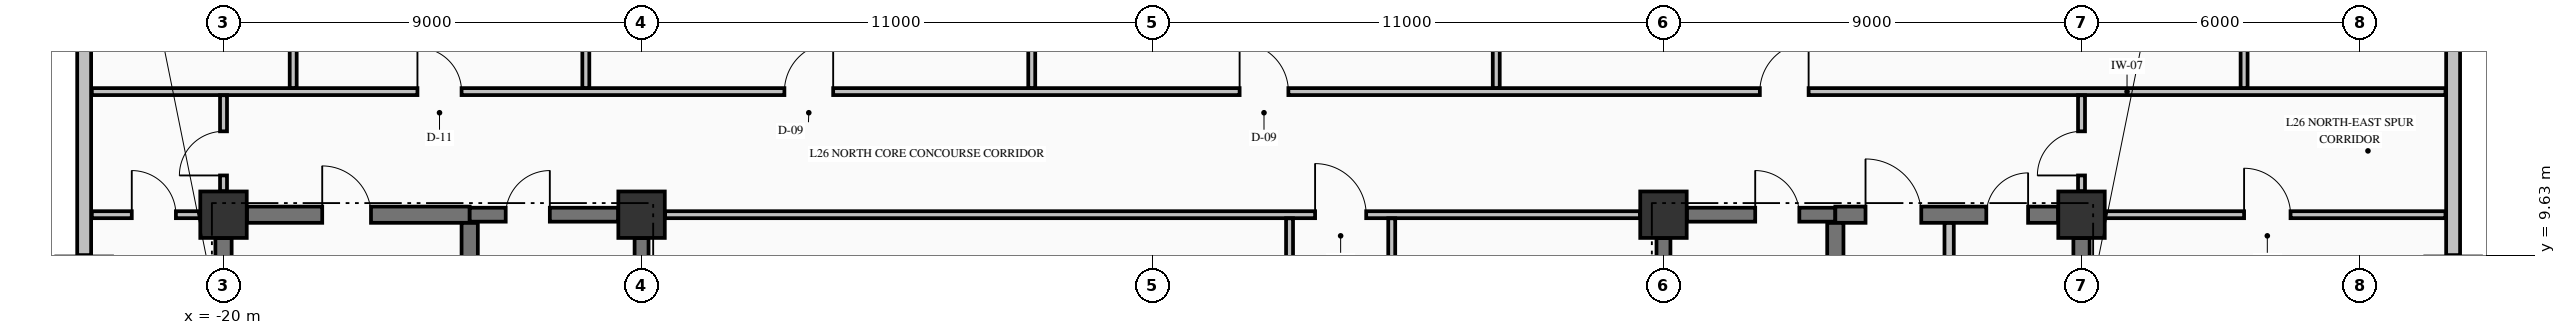
"""IFC4 building model, lengths in metres.
Left out: names, types, materials, properties, quantities, classifications, styles, units other than length and angle.
Written with IfcOpenShell. Run it as: python <this file> out.ifc"""

import sys

from ifc_helpers import new_model, si_unit, direction, frame, frame_2d, origin, origin_2d, place, context, subcontext, project, spatial, rectangle, extrude, element, fill, save


model = new_model("IFC4")
c1 = context("Model", 3, precision=1e-05, world=origin(), true_north=direction((0.0, 1.0)))
c2 = subcontext(c1, "Body", "Model", "MODEL_VIEW")
j1 = project(units=[si_unit("LENGTHUNIT", "METRE"), si_unit("PLANEANGLEUNIT", "RADIAN")], contexts=[c1])
p1 = place(None, origin())
s1 = spatial("IfcSite", under=j1, at=p1, CompositionType="ELEMENT")
p2 = place(p1, origin())
s2 = spatial("IfcBuilding", under=s1, at=p2, CompositionType="ELEMENT")
p3 = place(p2, frame((0.0, 0.0, 105.64)))
s3 = spatial("IfcBuildingStorey", under=s2, at=p3, CompositionType="ELEMENT", Elevation=105.64)
for number, where, z_axis, x_axis in (
    (1, (-20.0, 10.5, -0.25), (0.0, 0.0, 1.0), (1.0, 0.0, 0.0)),
    (2, (-11.0, 10.5, -0.25), (0.0, 0.0, 1.0), (1.0, 0.0, 0.0)),
    (3, (11.0, 10.5, -0.25), (0.0, 0.0, 1.0), (1.0, 0.0, 0.0)),
    (4, (20.0, 10.5, -0.25), (0.0, 0.0, 1.0), (1.0, 0.0, 0.0)),
):
    element("IfcColumn", number, at=place(p3, frame(where, z_axis=z_axis, x_axis=x_axis)), inside=s3, PredefinedType="COLUMN", context=c2, shape_type="SweptSolid", body=[
        extrude(rectangle(XDim=1.0, YDim=1.0, at=origin_2d()), origin(), (0.0, 0.0, 1.0), 3.57),
    ])
for number, where, z_axis, x_axis in (
    (5, (28.0, 9.63, 0.0), (0.0, 0.0, 1.0), (0.0, 1.0, 0.0)),
    (6, (-23.0, 20.37, 0.0), (0.0, 0.0, 1.0), (0.0, -1.0, 0.0)),
):
    element("IfcWall", number, at=place(p3, frame(where, z_axis=z_axis, x_axis=x_axis)), inside=s3, PredefinedType="STANDARD", context=c2, shape_type="SweptSolid", body=[
        extrude(rectangle(XDim=10.74, YDim=0.3, at=frame_2d((5.37, 0.0))), origin(), (0.0, 0.0, 1.0), 2.712),
    ])
p4 = place(p3, frame((-19.496, 10.5, 0.0), z_axis=(0.0, 0.0, 1.0), x_axis=(1.0, 0.0, 0.0)))
e7 = element("IfcWall", 7, at=p4, inside=s3, PredefinedType="SHEAR", context=c2, shape_type="SweptSolid", body=[
    extrude(rectangle(XDim=4.796, YDim=0.35, at=frame_2d((2.398, 0.0))), origin(), (0.0, 0.0, 1.0), 3.32),
])
p5 = place(p4, frame((1.621, 0.0, 0.0)))
e8 = element("IfcOpeningElement", 8, at=p5, cuts=e7, PredefinedType="OPENING", context=c2, shape_type="SweptSolid", body=[
    extrude(rectangle(XDim=1.05, YDim=2.15, at=frame_2d((0.525, 1.075))), frame((0.0, 0.185, 0.0), z_axis=(0.0, -1.0, 0.0), x_axis=(1.0, 0.0, 0.0)), (0.0, 0.0, 1.0), 0.37),
])
p6 = place(p3, frame((-14.7, 10.5, 0.0), z_axis=(0.0, 0.0, 1.0), x_axis=(1.0, 0.0, 0.0)))
e9 = element("IfcWall", 9, at=p6, inside=s3, PredefinedType="SHEAR", context=c2, shape_type="SweptSolid", body=[
    extrude(rectangle(XDim=3.196, YDim=0.3, at=frame_2d((1.598, 0.0))), origin(), (0.0, 0.0, 1.0), 3.32),
])
p7 = place(p6, frame((0.775, 0.0, 0.0)))
e10 = element("IfcOpeningElement", 10, at=p7, cuts=e9, PredefinedType="OPENING", context=c2, shape_type="SweptSolid", body=[
    extrude(rectangle(XDim=0.95, YDim=2.15, at=frame_2d((0.475, 1.075))), frame((0.0, 0.16, 0.0), z_axis=(0.0, -1.0, 0.0), x_axis=(1.0, 0.0, 0.0)), (0.0, 0.0, 1.0), 0.32),
])
p8 = place(p3, frame((11.504, 10.5, 0.0), z_axis=(0.0, 0.0, 1.0), x_axis=(1.0, 0.0, 0.0)))
e11 = element("IfcWall", 11, at=p8, inside=s3, PredefinedType="SHEAR", context=c2, shape_type="SweptSolid", body=[
    extrude(rectangle(XDim=3.196, YDim=0.3, at=frame_2d((1.598, 0.0))), origin(), (0.0, 0.0, 1.0), 3.32),
])
p9 = place(p8, frame((1.471, 0.0, 0.0)))
e12 = element("IfcOpeningElement", 12, at=p9, cuts=e11, PredefinedType="OPENING", context=c2, shape_type="SweptSolid", body=[
    extrude(rectangle(XDim=0.95, YDim=2.15, at=frame_2d((0.475, 1.075))), frame((0.0, 0.16, 0.0), z_axis=(0.0, -1.0, 0.0), x_axis=(1.0, 0.0, 0.0)), (0.0, 0.0, 1.0), 0.32),
])
p10 = place(p3, frame((14.7, 10.5, 0.0), z_axis=(0.0, 0.0, 1.0), x_axis=(1.0, 0.0, 0.0)))
e13 = element("IfcWall", 13, at=p10, inside=s3, PredefinedType="SHEAR", context=c2, shape_type="SweptSolid", body=[
    extrude(rectangle(XDim=4.796, YDim=0.35, at=frame_2d((2.398, 0.0))), origin(), (0.0, 0.0, 1.0), 3.32),
])
p11 = place(p10, frame((0.65, 0.0, 0.0)))
e14 = element("IfcOpeningElement", 14, at=p11, cuts=e13, PredefinedType="OPENING", context=c2, shape_type="SweptSolid", body=[
    extrude(rectangle(XDim=1.2, YDim=2.15, at=frame_2d((0.6, 1.075))), frame((0.0, 0.185, 0.0), z_axis=(0.0, -1.0, 0.0), x_axis=(1.0, 0.0, 0.0)), (0.0, 0.0, 1.0), 0.37),
])
p12 = place(p10, frame((3.25, 0.0, 0.0)))
e15 = element("IfcOpeningElement", 15, at=p12, cuts=e13, PredefinedType="OPENING", context=c2, shape_type="SweptSolid", body=[
    extrude(rectangle(XDim=0.9, YDim=2.15, at=frame_2d((0.45, 1.075))), frame((0.0, 0.185, 0.0), z_axis=(0.0, -1.0, 0.0), x_axis=(1.0, 0.0, 0.0)), (0.0, 0.0, 1.0), 0.37),
])
p13 = place(p3, frame((-22.835, 10.5, 0.0), z_axis=(0.0, 0.0, 1.0), x_axis=(1.0, 0.0, 0.0)))
e16 = element("IfcWall", 16, at=p13, inside=s3, PredefinedType="PARTITIONING", context=c2, shape_type="SweptSolid", body=[
    extrude(rectangle(XDim=2.329, YDim=0.15, at=frame_2d((1.165, 0.0))), origin(), (0.0, 0.0, 1.0), 3.32),
])
p14 = place(p13, frame((0.86, 0.0, 0.0)))
e17 = element("IfcOpeningElement", 17, at=p14, cuts=e16, PredefinedType="OPENING", context=c2, shape_type="SweptSolid", body=[
    extrude(rectangle(XDim=0.95, YDim=2.15, at=frame_2d((0.475, 1.075))), frame((0.0, 0.085, 0.0), z_axis=(0.0, -1.0, 0.0), x_axis=(1.0, 0.0, 0.0)), (0.0, 0.0, 1.0), 0.17),
])
p15 = place(p3, frame((-10.494, 10.5, 0.0), z_axis=(0.0, 0.0, 1.0), x_axis=(1.0, 0.0, 0.0)))
e18 = element("IfcWall", 18, at=p15, inside=s3, PredefinedType="PARTITIONING", context=c2, shape_type="SweptSolid", body=[
    extrude(rectangle(XDim=20.988, YDim=0.15, at=frame_2d((10.494, 0.0))), origin(), (0.0, 0.0, 1.0), 3.32),
])
p16 = place(p15, frame((13.994, 0.0, 0.0)))
e19 = element("IfcOpeningElement", 19, at=p16, cuts=e18, PredefinedType="OPENING", context=c2, shape_type="SweptSolid", body=[
    extrude(rectangle(XDim=1.1, YDim=2.15, at=frame_2d((0.55, 1.075))), frame((0.0, 0.085, 0.0), z_axis=(0.0, -1.0, 0.0), x_axis=(1.0, 0.0, 0.0)), (0.0, 0.0, 1.0), 0.17),
])
p17 = place(p3, frame((20.506, 10.5, 0.0), z_axis=(0.0, 0.0, 1.0), x_axis=(1.0, 0.0, 0.0)))
e20 = element("IfcWall", 20, at=p17, inside=s3, PredefinedType="PARTITIONING", context=c2, shape_type="SweptSolid", body=[
    extrude(rectangle(XDim=7.329, YDim=0.15, at=frame_2d((3.665, 0.0))), origin(), (0.0, 0.0, 1.0), 3.32),
])
p18 = place(p17, frame((2.994, 0.0, 0.0)))
e21 = element("IfcOpeningElement", 21, at=p18, cuts=e20, PredefinedType="OPENING", context=c2, shape_type="SweptSolid", body=[
    extrude(rectangle(XDim=1.0, YDim=2.15, at=frame_2d((0.5, 1.075))), frame((0.0, 0.085, 0.0), z_axis=(0.0, -1.0, 0.0), x_axis=(1.0, 0.0, 0.0)), (0.0, 0.0, 1.0), 0.17),
])
p19 = place(p3, frame((-22.835, 13.15, 0.0), z_axis=(0.0, 0.0, 1.0), x_axis=(1.0, 0.0, 0.0)))
e22 = element("IfcWall", 22, at=p19, inside=s3, PredefinedType="PARTITIONING", context=c2, shape_type="SweptSolid", body=[
    extrude(rectangle(XDim=50.67, YDim=0.15, at=frame_2d((25.335, 0.0))), origin(), (0.0, 0.0, 1.0), 3.32),
])
p20 = place(p19, frame((7.01, 0.0, 0.0)))
e23 = element("IfcOpeningElement", 23, at=p20, cuts=e22, PredefinedType="OPENING", context=c2, shape_type="SweptSolid", body=[
    extrude(rectangle(XDim=0.95, YDim=2.15, at=frame_2d((0.475, 1.075))), frame((0.0, 0.085, 0.0), z_axis=(0.0, -1.0, 0.0), x_axis=(1.0, 0.0, 0.0)), (0.0, 0.0, 1.0), 0.17),
])
p21 = place(p19, frame((14.91, 0.0, 0.0)))
e24 = element("IfcOpeningElement", 24, at=p21, cuts=e22, PredefinedType="OPENING", context=c2, shape_type="SweptSolid", body=[
    extrude(rectangle(XDim=1.05, YDim=2.15, at=frame_2d((0.525, 1.075))), frame((0.0, 0.085, 0.0), z_axis=(0.0, -1.0, 0.0), x_axis=(1.0, 0.0, 0.0)), (0.0, 0.0, 1.0), 0.17),
])
p22 = place(p19, frame((24.71, 0.0, 0.0)))
e25 = element("IfcOpeningElement", 25, at=p22, cuts=e22, PredefinedType="OPENING", context=c2, shape_type="SweptSolid", body=[
    extrude(rectangle(XDim=1.05, YDim=2.15, at=frame_2d((0.525, 1.075))), frame((0.0, 0.085, 0.0), z_axis=(0.0, -1.0, 0.0), x_axis=(1.0, 0.0, 0.0)), (0.0, 0.0, 1.0), 0.17),
])
p23 = place(p19, frame((35.91, 0.0, 0.0)))
e26 = element("IfcOpeningElement", 26, at=p23, cuts=e22, PredefinedType="OPENING", context=c2, shape_type="SweptSolid", body=[
    extrude(rectangle(XDim=1.05, YDim=2.15, at=frame_2d((0.525, 1.075))), frame((0.0, 0.085, 0.0), z_axis=(0.0, -1.0, 0.0), x_axis=(1.0, 0.0, 0.0)), (0.0, 0.0, 1.0), 0.17),
])
p24 = place(p3, frame((-20.0, 0.504, 0.0), z_axis=(0.0, 0.0, 1.0), x_axis=(0.0, 1.0, 0.0)))
e27 = element("IfcWall", 27, at=p24, inside=s3, PredefinedType="SHEAR", context=c2, shape_type="SweptSolid", body=[
    extrude(rectangle(XDim=9.492, YDim=0.35, at=frame_2d((4.746, 0.0))), origin(), (0.0, 0.0, 1.0), 3.32),
])
p25 = place(p3, frame((-14.7, 5.852, 0.0), z_axis=(0.0, 0.0, 1.0), x_axis=(0.0, 1.0, 0.0)))
e28 = element("IfcWall", 28, at=p25, inside=s3, PredefinedType="SHEAR", context=c2, shape_type="SweptSolid", body=[
    extrude(rectangle(XDim=4.471, YDim=0.35, at=frame_2d((2.235, 0.0))), origin(), (0.0, 0.0, 1.0), 3.32),
])
for number, where, z_axis, x_axis in (
    (29, (-11.0, 5.852, 0.0), (0.0, 0.0, 1.0), (0.0, 1.0, 0.0)),
    (30, (11.0, 5.852, 0.0), (0.0, 0.0, 1.0), (0.0, 1.0, 0.0)),
):
    element("IfcWall", number, at=place(p3, frame(where, z_axis=z_axis, x_axis=x_axis)), inside=s3, PredefinedType="SHEAR", context=c2, shape_type="SweptSolid", body=[
        extrude(rectangle(XDim=4.144, YDim=0.3, at=frame_2d((2.072, 0.0))), origin(), (0.0, 0.0, 1.0), 3.32),
    ])
p26 = place(p3, frame((14.7, 5.852, 0.0), z_axis=(0.0, 0.0, 1.0), x_axis=(0.0, 1.0, 0.0)))
e31 = element("IfcWall", 31, at=p26, inside=s3, PredefinedType="SHEAR", context=c2, shape_type="SweptSolid", body=[
    extrude(rectangle(XDim=4.471, YDim=0.35, at=frame_2d((2.235, 0.0))), origin(), (0.0, 0.0, 1.0), 3.32),
])
p27 = place(p3, frame((20.0, 5.377, 0.0), z_axis=(0.0, 0.0, 1.0), x_axis=(0.0, 1.0, 0.0)))
e32 = element("IfcWall", 32, at=p27, inside=s3, PredefinedType="SHEAR", context=c2, shape_type="SweptSolid", body=[
    extrude(rectangle(XDim=4.619, YDim=0.35, at=frame_2d((2.31, 0.0))), origin(), (0.0, 0.0, 1.0), 3.32),
])
p28 = place(p3, frame((-20.0, 11.006, 0.0), z_axis=(0.0, 0.0, 1.0), x_axis=(0.0, 1.0, 0.0)))
e33 = element("IfcWall", 33, at=p28, inside=s3, PredefinedType="PARTITIONING", context=c2, shape_type="SweptSolid", body=[
    extrude(rectangle(XDim=2.066, YDim=0.15, at=frame_2d((1.033, 0.0))), origin(), (0.0, 0.0, 1.0), 2.81),
])
p29 = place(p28, frame((0.339, 0.0, 0.0)))
e34 = element("IfcOpeningElement", 34, at=p29, cuts=e33, PredefinedType="OPENING", context=c2, shape_type="SweptSolid", body=[
    extrude(rectangle(XDim=0.95, YDim=2.15, at=frame_2d((0.475, 1.075))), frame((0.0, 0.085, 0.0), z_axis=(0.0, -1.0, 0.0), x_axis=(1.0, 0.0, 0.0)), (0.0, 0.0, 1.0), 0.17),
])
p30 = place(p3, frame((-18.5, 13.228, 0.0), z_axis=(0.0, 0.0, 1.0), x_axis=(0.0, 1.0, 0.0)))
e35 = element("IfcWall", 35, at=p30, inside=s3, PredefinedType="PARTITIONING", context=c2, shape_type="SweptSolid", body=[
    extrude(rectangle(XDim=7.166, YDim=0.15, at=frame_2d((3.583, 0.0))), origin(), (0.0, 0.0, 1.0), 3.32),
])
for number, where, z_axis, x_axis in (
    (36, (-12.2, 13.228, 0.0), (0.0, 0.0, 1.0), (0.0, 1.0, 0.0)),
    (37, (-2.6, 13.228, 0.0), (0.0, 0.0, 1.0), (0.0, 1.0, 0.0)),
):
    element("IfcWall", number, at=place(p3, frame(where, z_axis=z_axis, x_axis=x_axis)), inside=s3, PredefinedType="PARTITIONING", context=c2, shape_type="SweptSolid", body=[
        extrude(rectangle(XDim=12.107, YDim=0.15, at=frame_2d((6.053, 0.0))), origin(), (0.0, 0.0, 1.0), 3.32),
    ])
for number, where, z_axis, x_axis in (
    (38, (2.95, 2.978, 0.0), (0.0, 0.0, 1.0), (0.0, 1.0, 0.0)),
    (39, (5.15, 2.978, 0.0), (0.0, 0.0, 1.0), (0.0, 1.0, 0.0)),
):
    element("IfcWall", number, at=place(p3, frame(where, z_axis=z_axis, x_axis=x_axis)), inside=s3, PredefinedType="PARTITIONING", context=c2, shape_type="SweptSolid", body=[
        extrude(rectangle(XDim=7.444, YDim=0.15, at=frame_2d((3.722, 0.0))), origin(), (0.0, 0.0, 1.0), 3.32),
    ])
p31 = place(p3, frame((7.4, 13.228, 0.0), z_axis=(0.0, 0.0, 1.0), x_axis=(0.0, 1.0, 0.0)))
e40 = element("IfcWall", 40, at=p31, inside=s3, PredefinedType="PARTITIONING", context=c2, shape_type="SweptSolid", body=[
    extrude(rectangle(XDim=12.107, YDim=0.15, at=frame_2d((6.053, 0.0))), origin(), (0.0, 0.0, 1.0), 3.32),
])
p32 = place(p3, frame((17.15, 5.378, 0.0), z_axis=(0.0, 0.0, 1.0), x_axis=(0.0, 1.0, 0.0)))
e41 = element("IfcWall", 41, at=p32, inside=s3, PredefinedType="PARTITIONING", context=c2, shape_type="SweptSolid", body=[
    extrude(rectangle(XDim=4.944, YDim=0.2, at=frame_2d((2.472, 0.0))), origin(), (0.0, 0.0, 1.0), 3.32),
])
p33 = place(p3, frame((20.0, 11.006, 0.0), z_axis=(0.0, 0.0, 1.0), x_axis=(0.0, 1.0, 0.0)))
e42 = element("IfcWall", 42, at=p33, inside=s3, PredefinedType="PARTITIONING", context=c2, shape_type="SweptSolid", body=[
    extrude(rectangle(XDim=2.066, YDim=0.15, at=frame_2d((1.033, 0.0))), origin(), (0.0, 0.0, 1.0), 2.81),
])
p34 = place(p33, frame((0.339, 0.0, 0.0)))
e43 = element("IfcOpeningElement", 43, at=p34, cuts=e42, PredefinedType="OPENING", context=c2, shape_type="SweptSolid", body=[
    extrude(rectangle(XDim=0.95, YDim=2.15, at=frame_2d((0.475, 1.075))), frame((0.0, 0.085, 0.0), z_axis=(0.0, -1.0, 0.0), x_axis=(1.0, 0.0, 0.0)), (0.0, 0.0, 1.0), 0.17),
])
p35 = place(p3, frame((23.5, 13.228, 0.0), z_axis=(0.0, 0.0, 1.0), x_axis=(0.0, 1.0, 0.0)))
e44 = element("IfcWall", 44, at=p35, inside=s3, PredefinedType="PARTITIONING", context=c2, shape_type="SweptSolid", body=[
    extrude(rectangle(XDim=7.166, YDim=0.15, at=frame_2d((3.583, 0.0))), origin(), (0.0, 0.0, 1.0), 3.32),
])
p36 = place(p7, origin())
e45 = element("IfcDoor", 45, at=p36, inside=s3, OperationType="SINGLE_SWING_RIGHT", PredefinedType="DOOR", context=c2, shape_type="SweptSolid", body=[
    extrude(rectangle(XDim=0.95, YDim=2.15, at=frame_2d((0.475, 1.075))), frame((0.0, 0.025, 0.0), z_axis=(0.0, -1.0, 0.0), x_axis=(1.0, 0.0, 0.0)), (0.0, 0.0, 1.0), 0.05),
])
fill(e10, e45)
p37 = place(p9, origin())
e46 = element("IfcDoor", 46, at=p37, inside=s3, OperationType="SINGLE_SWING_LEFT", PredefinedType="DOOR", context=c2, shape_type="SweptSolid", body=[
    extrude(rectangle(XDim=0.95, YDim=2.15, at=frame_2d((0.475, 1.075))), frame((0.0, 0.025, 0.0), z_axis=(0.0, -1.0, 0.0), x_axis=(1.0, 0.0, 0.0)), (0.0, 0.0, 1.0), 0.05),
])
fill(e12, e46)
p38 = place(p5, origin())
e47 = element("IfcDoor", 47, at=p38, inside=s3, OperationType="SINGLE_SWING_LEFT", PredefinedType="DOOR", context=c2, shape_type="SweptSolid", body=[
    extrude(rectangle(XDim=1.05, YDim=2.15, at=frame_2d((0.525, 1.075))), frame((0.0, 0.025, 0.0), z_axis=(0.0, -1.0, 0.0), x_axis=(1.0, 0.0, 0.0)), (0.0, 0.0, 1.0), 0.05),
])
fill(e8, e47)
p39 = place(p11, origin())
e48 = element("IfcDoor", 48, at=p39, inside=s3, OperationType="SINGLE_SWING_LEFT", PredefinedType="DOOR", context=c2, shape_type="SweptSolid", body=[
    extrude(rectangle(XDim=1.2, YDim=2.15, at=frame_2d((0.6, 1.075))), frame((0.0, 0.025, 0.0), z_axis=(0.0, -1.0, 0.0), x_axis=(1.0, 0.0, 0.0)), (0.0, 0.0, 1.0), 0.05),
])
fill(e14, e48)
p40 = place(p12, origin())
e49 = element("IfcDoor", 49, at=p40, inside=s3, OperationType="SINGLE_SWING_RIGHT", PredefinedType="DOOR", context=c2, shape_type="SweptSolid", body=[
    extrude(rectangle(XDim=0.9, YDim=2.15, at=frame_2d((0.45, 1.075))), frame((0.0, 0.025, 0.0), z_axis=(0.0, -1.0, 0.0), x_axis=(1.0, 0.0, 0.0)), (0.0, 0.0, 1.0), 0.05),
])
fill(e15, e49)
p41 = place(p16, origin())
e50 = element("IfcDoor", 50, at=p41, inside=s3, OperationType="SINGLE_SWING_LEFT", PredefinedType="DOOR", context=c2, shape_type="SweptSolid", body=[
    extrude(rectangle(XDim=1.1, YDim=2.15, at=frame_2d((0.55, 1.075))), frame((0.0, 0.025, 0.0), z_axis=(0.0, -1.0, 0.0), x_axis=(1.0, 0.0, 0.0)), (0.0, 0.0, 1.0), 0.05),
])
fill(e19, e50)
p42 = place(p20, origin())
e51 = element("IfcDoor", 51, at=p42, inside=s3, OperationType="SINGLE_SWING_LEFT", PredefinedType="DOOR", context=c2, shape_type="SweptSolid", body=[
    extrude(rectangle(XDim=0.95, YDim=2.15, at=frame_2d((0.475, 1.075))), frame((0.0, 0.025, 0.0), z_axis=(0.0, -1.0, 0.0), x_axis=(1.0, 0.0, 0.0)), (0.0, 0.0, 1.0), 0.05),
])
fill(e23, e51)
p43 = place(p21, origin())
e52 = element("IfcDoor", 52, at=p43, inside=s3, OperationType="SINGLE_SWING_RIGHT", PredefinedType="DOOR", context=c2, shape_type="SweptSolid", body=[
    extrude(rectangle(XDim=1.05, YDim=2.15, at=frame_2d((0.525, 1.075))), frame((0.0, 0.025, 0.0), z_axis=(0.0, -1.0, 0.0), x_axis=(1.0, 0.0, 0.0)), (0.0, 0.0, 1.0), 0.05),
])
fill(e24, e52)
p44 = place(p22, origin())
e53 = element("IfcDoor", 53, at=p44, inside=s3, OperationType="SINGLE_SWING_LEFT", PredefinedType="DOOR", context=c2, shape_type="SweptSolid", body=[
    extrude(rectangle(XDim=1.05, YDim=2.15, at=frame_2d((0.525, 1.075))), frame((0.0, 0.025, 0.0), z_axis=(0.0, -1.0, 0.0), x_axis=(1.0, 0.0, 0.0)), (0.0, 0.0, 1.0), 0.05),
])
fill(e25, e53)
p45 = place(p23, origin())
e54 = element("IfcDoor", 54, at=p45, inside=s3, OperationType="SINGLE_SWING_RIGHT", PredefinedType="DOOR", context=c2, shape_type="SweptSolid", body=[
    extrude(rectangle(XDim=1.05, YDim=2.15, at=frame_2d((0.525, 1.075))), frame((0.0, 0.025, 0.0), z_axis=(0.0, -1.0, 0.0), x_axis=(1.0, 0.0, 0.0)), (0.0, 0.0, 1.0), 0.05),
])
fill(e26, e54)
p46 = place(p29, origin())
e55 = element("IfcDoor", 55, at=p46, inside=s3, OperationType="SINGLE_SWING_LEFT", PredefinedType="DOOR", context=c2, shape_type="SweptSolid", body=[
    extrude(rectangle(XDim=0.95, YDim=2.15, at=frame_2d((0.475, 1.075))), frame((0.0, 0.025, 0.0), z_axis=(0.0, -1.0, 0.0), x_axis=(1.0, 0.0, 0.0)), (0.0, 0.0, 1.0), 0.05),
])
fill(e34, e55)
p47 = place(p14, origin())
e56 = element("IfcDoor", 56, at=p47, inside=s3, OperationType="SINGLE_SWING_LEFT", PredefinedType="DOOR", context=c2, shape_type="SweptSolid", body=[
    extrude(rectangle(XDim=0.95, YDim=2.15, at=frame_2d((0.475, 1.075))), frame((0.0, 0.025, 0.0), z_axis=(0.0, -1.0, 0.0), x_axis=(1.0, 0.0, 0.0)), (0.0, 0.0, 1.0), 0.05),
])
fill(e17, e56)
p48 = place(p34, origin())
e57 = element("IfcDoor", 57, at=p48, inside=s3, OperationType="SINGLE_SWING_LEFT", PredefinedType="DOOR", context=c2, shape_type="SweptSolid", body=[
    extrude(rectangle(XDim=0.95, YDim=2.15, at=frame_2d((0.475, 1.075))), frame((0.0, 0.025, 0.0), z_axis=(0.0, -1.0, 0.0), x_axis=(1.0, 0.0, 0.0)), (0.0, 0.0, 1.0), 0.05),
])
fill(e43, e57)
p49 = place(p18, origin())
e58 = element("IfcDoor", 58, at=p49, inside=s3, OperationType="SINGLE_SWING_LEFT", PredefinedType="DOOR", context=c2, shape_type="SweptSolid", body=[
    extrude(rectangle(XDim=1.0, YDim=2.15, at=frame_2d((0.5, 1.075))), frame((0.0, 0.025, 0.0), z_axis=(0.0, -1.0, 0.0), x_axis=(1.0, 0.0, 0.0)), (0.0, 0.0, 1.0), 0.05),
])
fill(e21, e58)
save(model, sys.argv[1])
